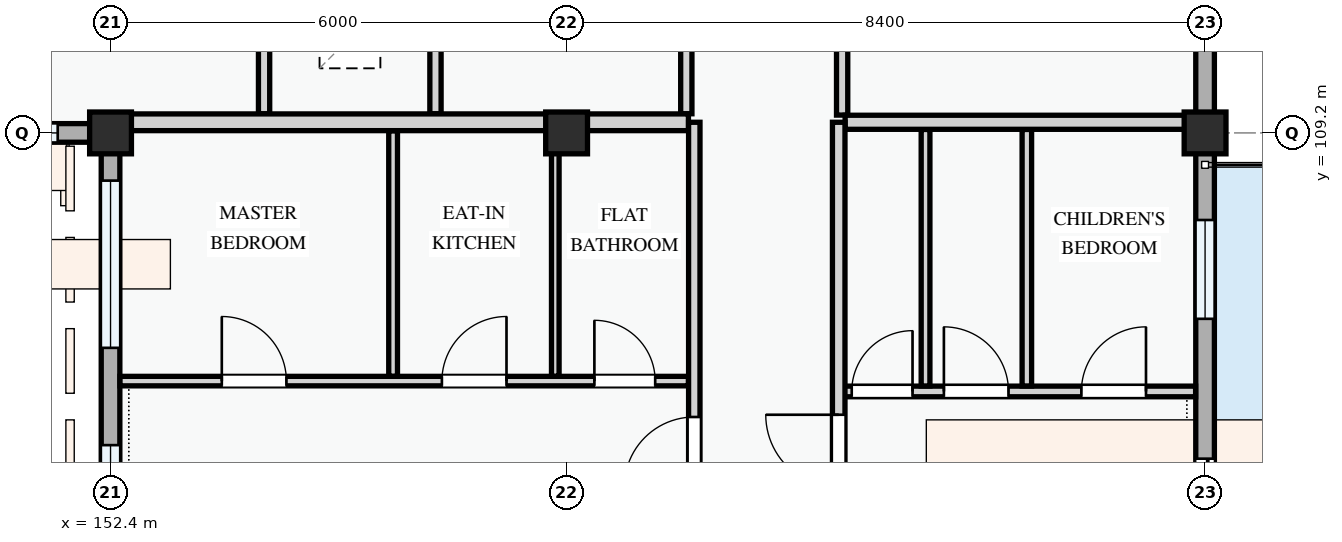
"""IFC4 building model, lengths in metres.
Left out: names, types, materials, properties, quantities, classifications, styles, units other than length and angle.
Written with IfcOpenShell. Run it as: python <this file> out.ifc"""

import sys

from ifc_helpers import new_model, si_unit, direction, frame, frame_2d, origin, origin_2d, place, context, subcontext, project, spatial, rectangle, extrude, element, fill, save


model = new_model("IFC4")
c1 = context("Model", 3, precision=1e-05, world=origin(), true_north=direction((0.0, 1.0)))
c2 = subcontext(c1, "Body", "Model", "MODEL_VIEW")
j1 = project(units=[si_unit("LENGTHUNIT", "METRE"), si_unit("PLANEANGLEUNIT", "RADIAN")], contexts=[c1])
p1 = place(None, origin())
s1 = spatial("IfcSite", under=j1, at=p1, CompositionType="ELEMENT")
p2 = place(p1, origin())
s2 = spatial("IfcBuilding", under=s1, at=p2, CompositionType="ELEMENT")
p3 = place(p2, frame((0.0, 0.0, 37.8)))
s3 = spatial("IfcBuildingStorey", under=s2, at=p3, CompositionType="ELEMENT", Elevation=37.8)
for number, where, z_axis, x_axis in (
    (1, (152.4, 109.2, 0.0), (0.0, 0.0, 1.0), (1.0, 0.0, 0.0)),
    (2, (158.4, 109.2, 0.0), (0.0, 0.0, 1.0), (1.0, 0.0, 0.0)),
    (3, (166.8, 109.2, 0.0), (0.0, 0.0, 1.0), (1.0, 0.0, 0.0)),
):
    element("IfcColumn", number, at=place(p3, frame(where, z_axis=z_axis, x_axis=x_axis)), inside=s3, PredefinedType="COLUMN", context=c2, shape_type="SweptSolid", body=[
        extrude(rectangle(XDim=0.55, YDim=0.55, at=origin_2d()), origin(), (0.0, 0.0, 1.0), 3.3),
    ])
p4 = place(p3, frame((166.8, 109.2, 0.0), z_axis=(0.0, 0.0, 1.0), x_axis=(0.0, 1.0, 0.0)))
e4 = element("IfcWall", 4, at=p4, inside=s3, PredefinedType="STANDARD", context=c2, shape_type="SweptSolid", body=[
    extrude(rectangle(XDim=6.0, YDim=0.245, at=frame_2d((3.0, 0.0))), origin(), (0.0, 0.0, 1.0), 2.575),
])
p5 = place(p4, frame((1.155, 0.0, 0.78)))
e5 = element("IfcOpeningElement", 5, at=p5, cuts=e4, PredefinedType="OPENING", context=c2, shape_type="SweptSolid", body=[
    extrude(rectangle(XDim=2.08, YDim=1.52, at=frame_2d((1.04, 0.76))), frame((0.0, 0.133, 0.0), z_axis=(0.0, -1.0, 0.0), x_axis=(1.0, 0.0, 0.0)), (0.0, 0.0, 1.0), 0.265),
])
p6 = place(p4, frame((4.53, 0.0, 0.78)))
e6 = element("IfcOpeningElement", 6, at=p6, cuts=e4, PredefinedType="OPENING", context=c2, shape_type="SweptSolid", body=[
    extrude(rectangle(XDim=0.95, YDim=1.15, at=frame_2d((0.475, 0.575))), frame((0.0, 0.133, 0.0), z_axis=(0.0, -1.0, 0.0), x_axis=(1.0, 0.0, 0.0)), (0.0, 0.0, 1.0), 0.265),
])
p7 = place(p3, frame((144.0, 109.2, 0.0), z_axis=(0.0, 0.0, 1.0), x_axis=(1.0, 0.0, 0.0)))
e7 = element("IfcWall", 7, at=p7, inside=s3, PredefinedType="STANDARD", context=c2, shape_type="SweptSolid", body=[
    extrude(rectangle(XDim=8.4, YDim=0.245, at=frame_2d((4.2, 0.0))), origin(), (0.0, 0.0, 1.0), 2.375),
])
p8 = place(p7, frame((1.14, 0.0, 0.78)))
e8 = element("IfcOpeningElement", 8, at=p8, cuts=e7, PredefinedType="OPENING", context=c2, shape_type="SweptSolid", body=[
    extrude(rectangle(XDim=1.1, YDim=1.3, at=frame_2d((0.55, 0.65))), frame((0.0, 0.133, 0.0), z_axis=(0.0, -1.0, 0.0), x_axis=(1.0, 0.0, 0.0)), (0.0, 0.0, 1.0), 0.265),
])
p9 = place(p7, frame((4.025, 0.0, 0.78)))
e9 = element("IfcOpeningElement", 9, at=p9, cuts=e7, PredefinedType="OPENING", context=c2, shape_type="SweptSolid", body=[
    extrude(rectangle(XDim=1.05, YDim=1.2, at=frame_2d((0.525, 0.6))), frame((0.0, 0.133, 0.0), z_axis=(0.0, -1.0, 0.0), x_axis=(1.0, 0.0, 0.0)), (0.0, 0.0, 1.0), 0.265),
])
p10 = place(p7, frame((6.555, 0.0, 0.78)))
e10 = element("IfcOpeningElement", 10, at=p10, cuts=e7, PredefinedType="OPENING", context=c2, shape_type="SweptSolid", body=[
    extrude(rectangle(XDim=1.15, YDim=1.25, at=frame_2d((0.575, 0.625))), frame((0.0, 0.133, 0.0), z_axis=(0.0, -1.0, 0.0), x_axis=(1.0, 0.0, 0.0)), (0.0, 0.0, 1.0), 0.265),
])
p11 = place(p3, frame((152.4, 109.2, 0.0), z_axis=(0.0, 0.0, 1.0), x_axis=(0.0, -1.0, 0.0)))
e11 = element("IfcWall", 11, at=p11, inside=s3, PredefinedType="STANDARD", context=c2, shape_type="SweptSolid", body=[
    extrude(rectangle(XDim=8.4, YDim=0.245, at=frame_2d((4.2, 0.0))), origin(), (0.0, 0.0, 1.0), 2.425),
])
p12 = place(p11, frame((0.627, 0.0, 0.78)))
e12 = element("IfcOpeningElement", 12, at=p12, cuts=e11, PredefinedType="OPENING", context=c2, shape_type="SweptSolid", body=[
    extrude(rectangle(XDim=2.2, YDim=1.5, at=frame_2d((1.1, 0.75))), frame((0.0, 0.133, 0.0), z_axis=(0.0, -1.0, 0.0), x_axis=(1.0, 0.0, 0.0)), (0.0, 0.0, 1.0), 0.265),
])
p13 = place(p11, frame((4.107, 0.0, 0.78)))
e13 = element("IfcOpeningElement", 13, at=p13, cuts=e11, PredefinedType="OPENING", context=c2, shape_type="SweptSolid", body=[
    extrude(rectangle(XDim=1.72, YDim=1.52, at=frame_2d((0.86, 0.76))), frame((0.0, 0.133, 0.0), z_axis=(0.0, -1.0, 0.0), x_axis=(1.0, 0.0, 0.0)), (0.0, 0.0, 1.0), 0.265),
])
p14 = place(p11, frame((6.965, 0.0, 0.78)))
e14 = element("IfcOpeningElement", 14, at=p14, cuts=e11, PredefinedType="OPENING", context=c2, shape_type="SweptSolid", body=[
    extrude(rectangle(XDim=0.95, YDim=1.15, at=frame_2d((0.475, 0.575))), frame((0.0, 0.133, 0.0), z_axis=(0.0, -1.0, 0.0), x_axis=(1.0, 0.0, 0.0)), (0.0, 0.0, 1.0), 0.265),
])
p15 = place(p3, frame((166.8, 100.8, 0.0), z_axis=(0.0, 0.0, 1.0), x_axis=(0.0, 1.0, 0.0)))
e15 = element("IfcWall", 15, at=p15, inside=s3, PredefinedType="STANDARD", context=c2, shape_type="SweptSolid", body=[
    extrude(rectangle(XDim=8.4, YDim=0.245, at=frame_2d((4.2, 0.0))), origin(), (0.0, 0.0, 1.0), 2.425),
])
p16 = place(p15, frame((2.615, 0.0, 0.0)))
e16 = element("IfcOpeningElement", 16, at=p16, cuts=e15, PredefinedType="OPENING", context=c2, shape_type="SweptSolid", body=[
    extrude(rectangle(XDim=1.5, YDim=2.2, at=frame_2d((0.75, 1.1))), frame((0.0, 0.133, 0.0), z_axis=(0.0, -1.0, 0.0), x_axis=(1.0, 0.0, 0.0)), (0.0, 0.0, 1.0), 0.265),
])
p17 = place(p15, frame((0.485, 0.0, 0.78)))
e17 = element("IfcOpeningElement", 17, at=p17, cuts=e15, PredefinedType="OPENING", context=c2, shape_type="SweptSolid", body=[
    extrude(rectangle(XDim=0.95, YDim=1.15, at=frame_2d((0.475, 0.575))), frame((0.0, 0.133, 0.0), z_axis=(0.0, -1.0, 0.0), x_axis=(1.0, 0.0, 0.0)), (0.0, 0.0, 1.0), 0.265),
])
p18 = place(p15, frame((5.954, 0.0, 0.78)))
e18 = element("IfcOpeningElement", 18, at=p18, cuts=e15, PredefinedType="OPENING", context=c2, shape_type="SweptSolid", body=[
    extrude(rectangle(XDim=1.3, YDim=1.4, at=frame_2d((0.65, 0.7))), frame((0.0, 0.133, 0.0), z_axis=(0.0, -1.0, 0.0), x_axis=(1.0, 0.0, 0.0)), (0.0, 0.0, 1.0), 0.265),
])
for number, where, z_axis, x_axis in (
    (19, (154.42, 113.324, 0.0), (0.0, 0.0, 1.0), (0.0, -1.0, 0.0)),
    (20, (156.675, 113.324, 0.0), (0.0, 0.0, 1.0), (0.0, -1.0, 0.0)),
    (21, (159.975, 113.324, 0.0), (0.0, 0.0, 1.0), (0.0, -1.0, 0.0)),
):
    element("IfcWall", number, at=place(p3, frame(where, z_axis=z_axis, x_axis=x_axis)), inside=s3, PredefinedType="PARTITIONING", context=c2, shape_type="SweptSolid", body=[
        extrude(rectangle(XDim=3.872, YDim=0.148, at=frame_2d((1.936, 0.0))), origin(), (0.0, 0.0, 1.0), 3.0),
    ])
p19 = place(p3, frame((162.025, 113.324, 0.0), z_axis=(0.0, 0.0, 1.0), x_axis=(0.0, -1.0, 0.0)))
e22 = element("IfcWall", 22, at=p19, inside=s3, PredefinedType="PARTITIONING", context=c2, shape_type="SweptSolid", body=[
    extrude(rectangle(XDim=3.889, YDim=0.148, at=frame_2d((1.945, 0.0))), origin(), (0.0, 0.0, 1.0), 3.0),
])
p20 = place(p3, frame((152.524, 105.935, 0.0), z_axis=(0.0, 0.0, 1.0), x_axis=(1.0, 0.0, 0.0)))
e23 = element("IfcWall", 23, at=p20, inside=s3, PredefinedType="PARTITIONING", context=c2, shape_type="SweptSolid", body=[
    extrude(rectangle(XDim=7.479, YDim=0.125, at=frame_2d((3.739, 0.0))), origin(), (0.0, 0.0, 1.0), 3.0),
])
p21 = place(p20, frame((1.339, 0.0, 0.0)))
e24 = element("IfcOpeningElement", 24, at=p21, cuts=e23, PredefinedType="OPENING", context=c2, shape_type="SweptSolid", body=[
    extrude(rectangle(XDim=0.85, YDim=2.1, at=frame_2d((0.425, 1.05))), frame((0.0, 0.073, 0.0), z_axis=(0.0, -1.0, 0.0), x_axis=(1.0, 0.0, 0.0)), (0.0, 0.0, 1.0), 0.145),
])
p22 = place(p20, frame((4.235, 0.0, 0.0)))
e25 = element("IfcOpeningElement", 25, at=p22, cuts=e23, PredefinedType="OPENING", context=c2, shape_type="SweptSolid", body=[
    extrude(rectangle(XDim=0.85, YDim=2.1, at=frame_2d((0.425, 1.05))), frame((0.0, 0.073, 0.0), z_axis=(0.0, -1.0, 0.0), x_axis=(1.0, 0.0, 0.0)), (0.0, 0.0, 1.0), 0.145),
])
p23 = place(p20, frame((6.241, 0.0, 0.0)))
e26 = element("IfcOpeningElement", 26, at=p23, cuts=e23, PredefinedType="OPENING", context=c2, shape_type="SweptSolid", body=[
    extrude(rectangle(XDim=0.8, YDim=2.1, at=frame_2d((0.4, 1.05))), frame((0.0, 0.073, 0.0), z_axis=(0.0, -1.0, 0.0), x_axis=(1.0, 0.0, 0.0)), (0.0, 0.0, 1.0), 0.145),
])
p24 = place(p3, frame((156.118, 106.0, 0.0), z_axis=(0.0, 0.0, 1.0), x_axis=(0.0, 1.0, 0.0)))
e27 = element("IfcWall", 27, at=p24, inside=s3, PredefinedType="PARTITIONING", context=c2, shape_type="SweptSolid", body=[
    extrude(rectangle(XDim=3.229, YDim=0.115, at=frame_2d((1.614, 0.0))), origin(), (0.0, 0.0, 1.0), 3.0),
])
p25 = place(p3, frame((158.251, 106.0, 0.0), z_axis=(0.0, 0.0, 1.0), x_axis=(0.0, 1.0, 0.0)))
e28 = element("IfcWall", 28, at=p25, inside=s3, PredefinedType="PARTITIONING", context=c2, shape_type="SweptSolid", body=[
    extrude(rectangle(XDim=3.229, YDim=0.1, at=frame_2d((1.614, 0.0))), origin(), (0.0, 0.0, 1.0), 2.425),
])
p26 = place(p3, frame((161.98, 105.799, 0.0), z_axis=(0.0, 0.0, 1.0), x_axis=(1.0, 0.0, 0.0)))
e29 = element("IfcWall", 29, at=p26, inside=s3, PredefinedType="PARTITIONING", context=c2, shape_type="SweptSolid", body=[
    extrude(rectangle(XDim=4.696, YDim=0.14, at=frame_2d((2.348, 0.0))), origin(), (0.0, 0.0, 1.0), 3.0),
])
p27 = place(p26, frame((0.171, 0.0, 0.0)))
e30 = element("IfcOpeningElement", 30, at=p27, cuts=e29, PredefinedType="OPENING", context=c2, shape_type="SweptSolid", body=[
    extrude(rectangle(XDim=0.8, YDim=2.1, at=frame_2d((0.4, 1.05))), frame((0.0, 0.08, 0.0), z_axis=(0.0, -1.0, 0.0), x_axis=(1.0, 0.0, 0.0)), (0.0, 0.0, 1.0), 0.16),
])
p28 = place(p26, frame((1.384, 0.0, 0.0)))
e31 = element("IfcOpeningElement", 31, at=p28, cuts=e29, PredefinedType="OPENING", context=c2, shape_type="SweptSolid", body=[
    extrude(rectangle(XDim=0.85, YDim=2.1, at=frame_2d((0.425, 1.05))), frame((0.0, 0.08, 0.0), z_axis=(0.0, -1.0, 0.0), x_axis=(1.0, 0.0, 0.0)), (0.0, 0.0, 1.0), 0.16),
])
p29 = place(p26, frame((3.193, 0.0, 0.0)))
e32 = element("IfcOpeningElement", 32, at=p29, cuts=e29, PredefinedType="OPENING", context=c2, shape_type="SweptSolid", body=[
    extrude(rectangle(XDim=0.85, YDim=2.1, at=frame_2d((0.425, 1.05))), frame((0.0, 0.08, 0.0), z_axis=(0.0, -1.0, 0.0), x_axis=(1.0, 0.0, 0.0)), (0.0, 0.0, 1.0), 0.16),
])
p30 = place(p3, frame((164.455, 105.871, 0.0), z_axis=(0.0, 0.0, 1.0), x_axis=(0.0, 1.0, 0.0)))
e33 = element("IfcWall", 33, at=p30, inside=s3, PredefinedType="PARTITIONING", context=c2, shape_type="SweptSolid", body=[
    extrude(rectangle(XDim=3.375, YDim=0.125, at=frame_2d((1.688, 0.0))), origin(), (0.0, 0.0, 1.0), 3.0),
])
p31 = place(p3, frame((163.122, 105.871, 0.0), z_axis=(0.0, 0.0, 1.0), x_axis=(0.0, 1.0, 0.0)))
e34 = element("IfcWall", 34, at=p31, inside=s3, PredefinedType="PARTITIONING", context=c2, shape_type="SweptSolid", body=[
    extrude(rectangle(XDim=3.375, YDim=0.115, at=frame_2d((1.688, 0.0))), origin(), (0.0, 0.0, 1.0), 3.0),
])
p32 = place(p3, frame((152.46, 109.34, 0.0), z_axis=(0.0, 0.0, 1.0), x_axis=(1.0, 0.0, 0.0)))
e35 = element("IfcWall", 35, at=p32, inside=s3, PredefinedType="PARTITIONING", context=c2, shape_type="SweptSolid", body=[
    extrude(rectangle(XDim=7.543, YDim=0.22, at=frame_2d((3.771, 0.0))), origin(), (0.0, 0.0, 1.0), 2.375),
])
p33 = place(p3, frame((162.064, 109.34, 0.0), z_axis=(0.0, 0.0, 1.0), x_axis=(1.0, 0.0, 0.0)))
e36 = element("IfcWall", 36, at=p33, inside=s3, PredefinedType="PARTITIONING", context=c2, shape_type="SweptSolid", body=[
    extrude(rectangle(XDim=4.611, YDim=0.185, at=frame_2d((2.306, 0.0))), origin(), (0.0, 0.0, 1.0), 2.375),
])
p34 = place(p3, frame((160.08, 86.46, 0.0), z_axis=(0.0, 0.0, 1.0), x_axis=(0.0, 1.0, 0.0)))
e37 = element("IfcWall", 37, at=p34, inside=s3, PredefinedType="PARTITIONING", context=c2, shape_type="SweptSolid", body=[
    extrude(rectangle(XDim=22.88, YDim=0.15, at=frame_2d((11.44, 0.0))), origin(), (0.0, 0.0, 1.0), 3.0),
])
p35 = place(p34, frame((2.1, 0.0, 0.0)))
e38 = element("IfcOpeningElement", 38, at=p35, cuts=e37, PredefinedType="OPENING", context=c2, shape_type="SweptSolid", body=[
    extrude(rectangle(XDim=0.96, YDim=2.12, at=frame_2d((0.48, 1.06))), frame((0.0, 0.085, 0.0), z_axis=(0.0, -1.0, 0.0), x_axis=(1.0, 0.0, 0.0)), (0.0, 0.0, 1.0), 0.17),
])
p36 = place(p34, frame((10.135, 0.0, 0.0)))
e39 = element("IfcOpeningElement", 39, at=p36, cuts=e37, PredefinedType="OPENING", context=c2, shape_type="SweptSolid", body=[
    extrude(rectangle(XDim=0.92, YDim=2.1, at=frame_2d((0.46, 1.05))), frame((0.0, 0.085, 0.0), z_axis=(0.0, -1.0, 0.0), x_axis=(1.0, 0.0, 0.0)), (0.0, 0.0, 1.0), 0.17),
])
p37 = place(p34, frame((18.083, 0.0, 0.0)))
e40 = element("IfcOpeningElement", 40, at=p37, cuts=e37, PredefinedType="OPENING", context=c2, shape_type="SweptSolid", body=[
    extrude(rectangle(XDim=0.92, YDim=2.1, at=frame_2d((0.46, 1.05))), frame((0.0, 0.085, 0.0), z_axis=(0.0, -1.0, 0.0), x_axis=(1.0, 0.0, 0.0)), (0.0, 0.0, 1.0), 0.17),
])
p38 = place(p3, frame((161.98, 86.46, 0.0), z_axis=(0.0, 0.0, 1.0), x_axis=(0.0, 1.0, 0.0)))
e41 = element("IfcWall", 41, at=p38, inside=s3, PredefinedType="PARTITIONING", context=c2, shape_type="SweptSolid", body=[
    extrude(rectangle(XDim=22.88, YDim=0.165, at=frame_2d((11.44, 0.0))), origin(), (0.0, 0.0, 1.0), 3.0),
])
p39 = place(p38, frame((1.968, 0.0, 0.0)))
e42 = element("IfcOpeningElement", 42, at=p39, cuts=e41, PredefinedType="OPENING", context=c2, shape_type="SweptSolid", body=[
    extrude(rectangle(XDim=0.92, YDim=2.1, at=frame_2d((0.46, 1.05))), frame((0.0, 0.093, 0.0), z_axis=(0.0, -1.0, 0.0), x_axis=(1.0, 0.0, 0.0)), (0.0, 0.0, 1.0), 0.185),
])
p40 = place(p38, frame((9.946, 0.0, 0.0)))
e43 = element("IfcOpeningElement", 43, at=p40, cuts=e41, PredefinedType="OPENING", context=c2, shape_type="SweptSolid", body=[
    extrude(rectangle(XDim=0.92, YDim=2.1, at=frame_2d((0.46, 1.05))), frame((0.0, 0.093, 0.0), z_axis=(0.0, -1.0, 0.0), x_axis=(1.0, 0.0, 0.0)), (0.0, 0.0, 1.0), 0.185),
])
p41 = place(p38, frame((18.072, 0.0, 0.0)))
e44 = element("IfcOpeningElement", 44, at=p41, cuts=e41, PredefinedType="OPENING", context=c2, shape_type="SweptSolid", body=[
    extrude(rectangle(XDim=0.96, YDim=2.12, at=frame_2d((0.48, 1.06))), frame((0.0, 0.093, 0.0), z_axis=(0.0, -1.0, 0.0), x_axis=(1.0, 0.0, 0.0)), (0.0, 0.0, 1.0), 0.185),
])
p42 = place(p10, origin())
e45 = element("IfcWindow", 45, at=p42, inside=s3, PartitioningType="SINGLE_PANEL", PredefinedType="WINDOW", context=c2, shape_type="SweptSolid", body=[
    extrude(rectangle(XDim=1.15, YDim=1.25, at=frame_2d((0.575, 0.625))), frame((0.0, 0.03, 0.0), z_axis=(0.0, -1.0, 0.0), x_axis=(1.0, 0.0, 0.0)), (0.0, 0.0, 1.0), 0.06),
])
fill(e10, e45)
p43 = place(p12, origin())
e46 = element("IfcWindow", 46, at=p43, inside=s3, PartitioningType="DOUBLE_PANEL_VERTICAL", PredefinedType="WINDOW", context=c2, shape_type="SweptSolid", body=[
    extrude(rectangle(XDim=2.2, YDim=1.5, at=frame_2d((1.1, 0.75))), frame((0.0, 0.03, 0.0), z_axis=(0.0, -1.0, 0.0), x_axis=(1.0, 0.0, 0.0)), (0.0, 0.0, 1.0), 0.06),
])
fill(e12, e46)
p44 = place(p13, origin())
e47 = element("IfcWindow", 47, at=p44, inside=s3, PartitioningType="DOUBLE_PANEL_VERTICAL", PredefinedType="WINDOW", context=c2, shape_type="SweptSolid", body=[
    extrude(rectangle(XDim=1.72, YDim=1.52, at=frame_2d((0.86, 0.76))), frame((0.0, 0.03, 0.0), z_axis=(0.0, -1.0, 0.0), x_axis=(1.0, 0.0, 0.0)), (0.0, 0.0, 1.0), 0.06),
])
fill(e13, e47)
p45 = place(p16, frame((1.5, 0.0, 0.0), z_axis=(0.0, 0.0, 1.0), x_axis=(-1.0, 0.0, 0.0)))
e48 = element("IfcDoor", 48, at=p45, inside=s3, OperationType="SLIDING_TO_RIGHT", PredefinedType="DOOR", context=c2, shape_type="SweptSolid", body=[
    extrude(rectangle(XDim=1.5, YDim=2.2, at=frame_2d((0.75, 1.1))), frame((0.0, 0.025, 0.0), z_axis=(0.0, -1.0, 0.0), x_axis=(1.0, 0.0, 0.0)), (0.0, 0.0, 1.0), 0.05),
])
fill(e16, e48)
p46 = place(p18, origin())
e49 = element("IfcWindow", 49, at=p46, inside=s3, PartitioningType="SINGLE_PANEL", PredefinedType="WINDOW", context=c2, shape_type="SweptSolid", body=[
    extrude(rectangle(XDim=1.3, YDim=1.4, at=frame_2d((0.65, 0.7))), frame((0.0, 0.03, 0.0), z_axis=(0.0, -1.0, 0.0), x_axis=(1.0, 0.0, 0.0)), (0.0, 0.0, 1.0), 0.06),
])
fill(e18, e49)
p47 = place(p21, origin())
e50 = element("IfcDoor", 50, at=p47, inside=s3, OperationType="SINGLE_SWING_LEFT", PredefinedType="DOOR", context=c2, shape_type="SweptSolid", body=[
    extrude(rectangle(XDim=0.85, YDim=2.1, at=frame_2d((0.425, 1.05))), frame((0.0, 0.025, 0.0), z_axis=(0.0, -1.0, 0.0), x_axis=(1.0, 0.0, 0.0)), (0.0, 0.0, 1.0), 0.05),
])
fill(e24, e50)
p48 = place(p22, origin())
e51 = element("IfcDoor", 51, at=p48, inside=s3, OperationType="SINGLE_SWING_RIGHT", PredefinedType="DOOR", context=c2, shape_type="SweptSolid", body=[
    extrude(rectangle(XDim=0.85, YDim=2.1, at=frame_2d((0.425, 1.05))), frame((0.0, 0.025, 0.0), z_axis=(0.0, -1.0, 0.0), x_axis=(1.0, 0.0, 0.0)), (0.0, 0.0, 1.0), 0.05),
])
fill(e25, e51)
p49 = place(p23, origin())
e52 = element("IfcDoor", 52, at=p49, inside=s3, OperationType="SINGLE_SWING_LEFT", PredefinedType="DOOR", context=c2, shape_type="SweptSolid", body=[
    extrude(rectangle(XDim=0.8, YDim=2.1, at=frame_2d((0.4, 1.05))), frame((0.0, 0.025, 0.0), z_axis=(0.0, -1.0, 0.0), x_axis=(1.0, 0.0, 0.0)), (0.0, 0.0, 1.0), 0.05),
])
fill(e26, e52)
p50 = place(p27, origin())
e53 = element("IfcDoor", 53, at=p50, inside=s3, OperationType="SINGLE_SWING_RIGHT", PredefinedType="DOOR", context=c2, shape_type="SweptSolid", body=[
    extrude(rectangle(XDim=0.8, YDim=2.1, at=frame_2d((0.4, 1.05))), frame((0.0, 0.025, 0.0), z_axis=(0.0, -1.0, 0.0), x_axis=(1.0, 0.0, 0.0)), (0.0, 0.0, 1.0), 0.05),
])
fill(e30, e53)
p51 = place(p28, origin())
e54 = element("IfcDoor", 54, at=p51, inside=s3, OperationType="SINGLE_SWING_LEFT", PredefinedType="DOOR", context=c2, shape_type="SweptSolid", body=[
    extrude(rectangle(XDim=0.85, YDim=2.1, at=frame_2d((0.425, 1.05))), frame((0.0, 0.025, 0.0), z_axis=(0.0, -1.0, 0.0), x_axis=(1.0, 0.0, 0.0)), (0.0, 0.0, 1.0), 0.05),
])
fill(e31, e54)
p52 = place(p29, origin())
e55 = element("IfcDoor", 55, at=p52, inside=s3, OperationType="SINGLE_SWING_RIGHT", PredefinedType="DOOR", context=c2, shape_type="SweptSolid", body=[
    extrude(rectangle(XDim=0.85, YDim=2.1, at=frame_2d((0.425, 1.05))), frame((0.0, 0.025, 0.0), z_axis=(0.0, -1.0, 0.0), x_axis=(1.0, 0.0, 0.0)), (0.0, 0.0, 1.0), 0.05),
])
fill(e32, e55)
p53 = place(p37, origin())
e56 = element("IfcDoor", 56, at=p53, inside=s3, OperationType="SINGLE_SWING_LEFT", PredefinedType="DOOR", context=c2, shape_type="SweptSolid", body=[
    extrude(rectangle(XDim=0.92, YDim=2.1, at=frame_2d((0.46, 1.05))), frame((0.0, 0.025, 0.0), z_axis=(0.0, -1.0, 0.0), x_axis=(1.0, 0.0, 0.0)), (0.0, 0.0, 1.0), 0.05),
])
fill(e40, e56)
p54 = place(p41, origin())
e57 = element("IfcDoor", 57, at=p54, inside=s3, OperationType="SINGLE_SWING_RIGHT", PredefinedType="DOOR", context=c2, shape_type="SweptSolid", body=[
    extrude(rectangle(XDim=0.96, YDim=2.12, at=frame_2d((0.48, 1.06))), frame((0.0, 0.025, 0.0), z_axis=(0.0, -1.0, 0.0), x_axis=(1.0, 0.0, 0.0)), (0.0, 0.0, 1.0), 0.05),
])
fill(e44, e57)
save(model, sys.argv[1])
